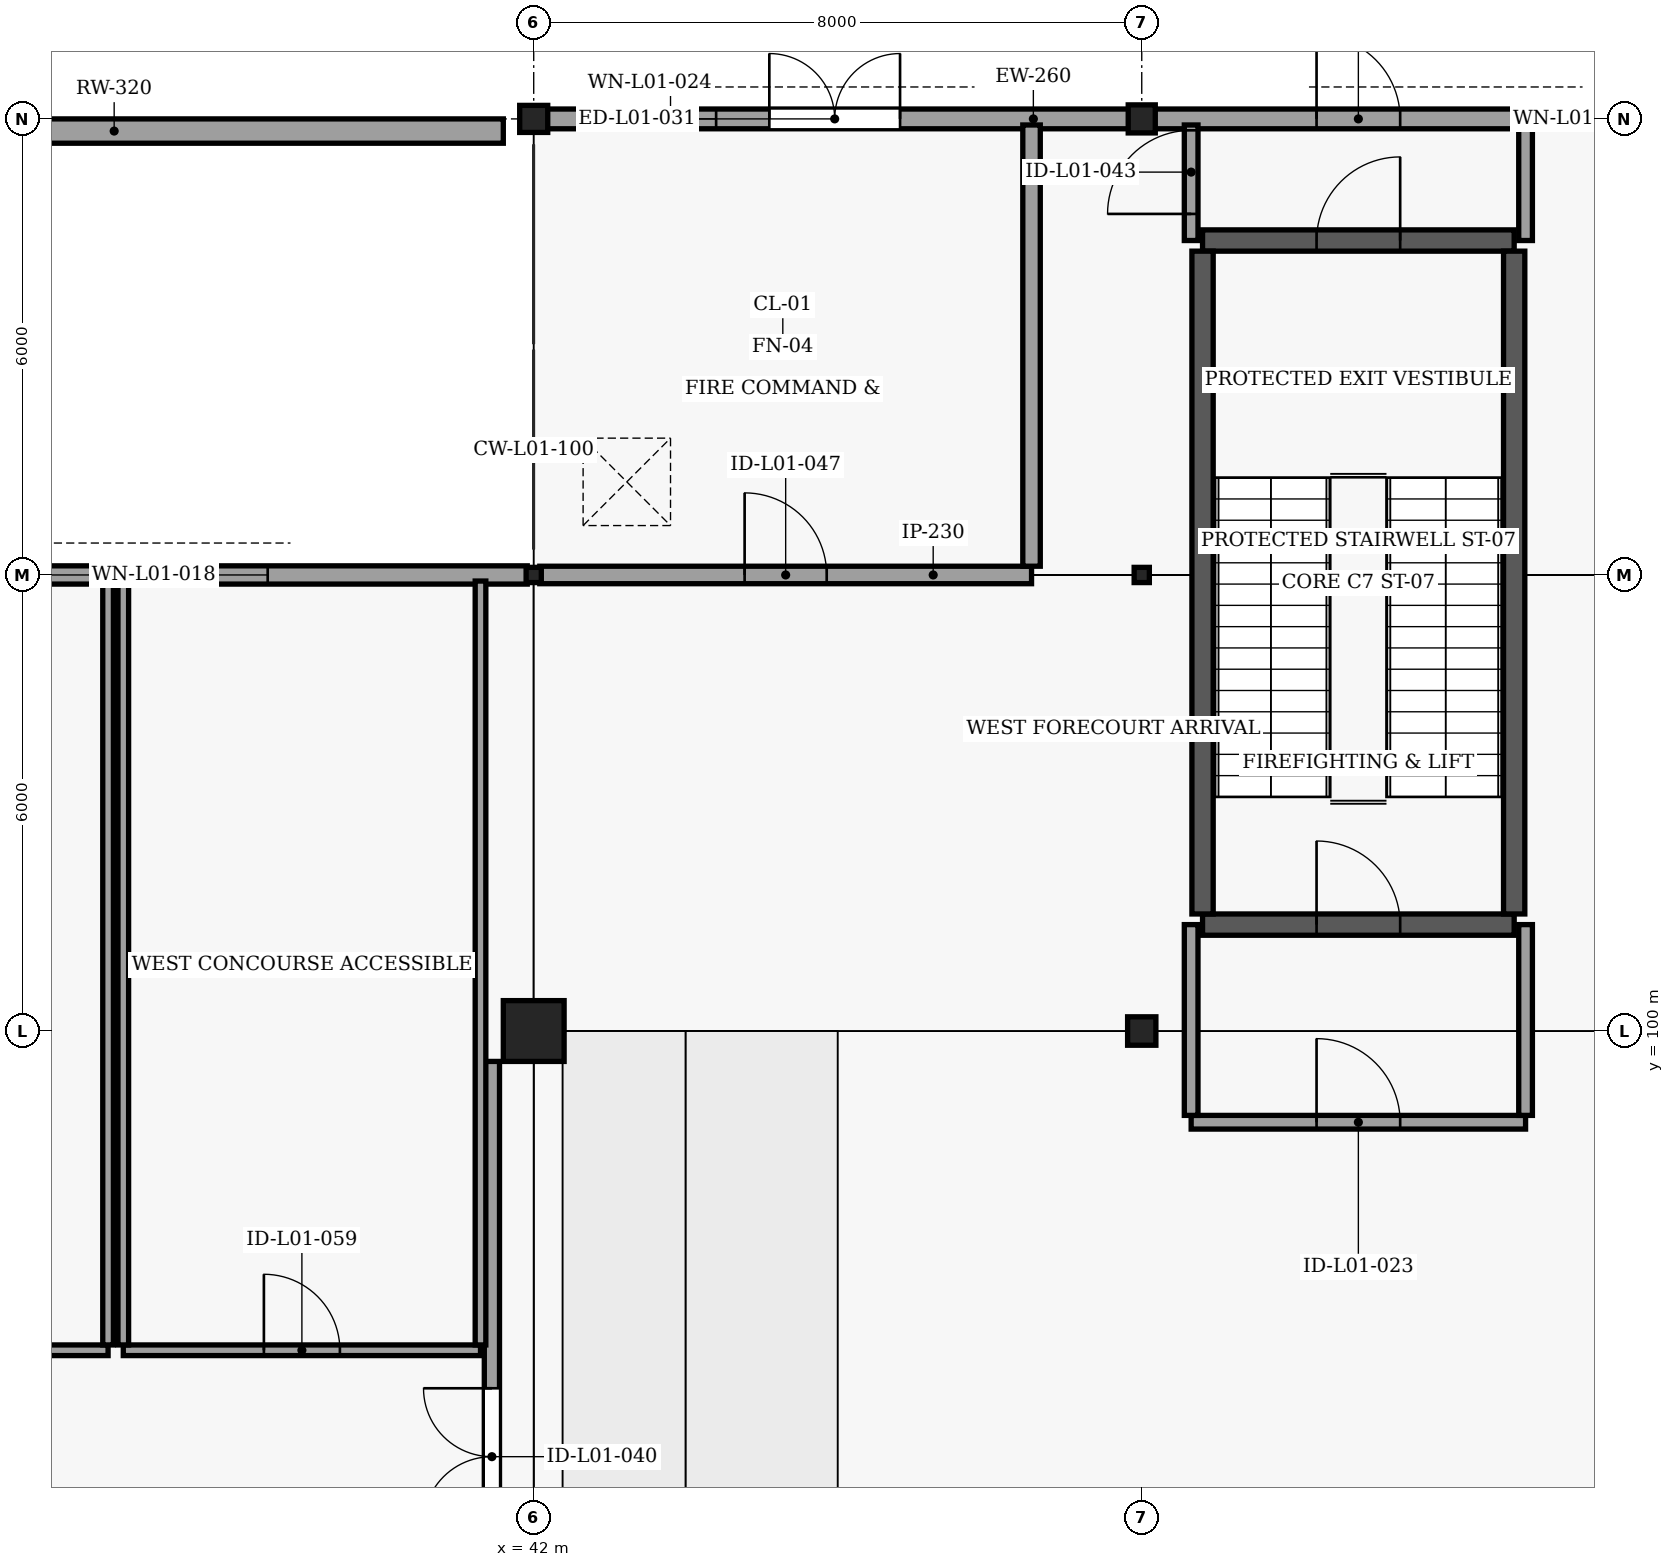
"""IFC4 building model, lengths in metres.
Left out: names, types, materials, properties, quantities, classifications, styles, units other than length and angle.
Written with IfcOpenShell. Run it as: python <this file> out.ifc"""

import sys

from ifc_helpers import new_model, si_unit, direction, frame, frame_2d, origin, origin_2d, place, context, subcontext, project, spatial, rectangle, hollow_rectangle, i_section, extrude, element, fill, save


model = new_model("IFC4")
c1 = context("Model", 3, precision=1e-05, world=origin(), true_north=direction((0.0, 1.0)))
c2 = subcontext(c1, "Body", "Model", "MODEL_VIEW")
j1 = project(units=[si_unit("LENGTHUNIT", "METRE"), si_unit("PLANEANGLEUNIT", "RADIAN")], contexts=[c1])
p1 = place(None, origin())
s1 = spatial("IfcSite", under=j1, at=p1, CompositionType="ELEMENT")
p2 = place(p1, origin())
s2 = spatial("IfcBuilding", under=s1, at=p2, CompositionType="ELEMENT")
p3 = place(p2, origin())
s3 = spatial("IfcBuildingStorey", under=s2, at=p3, CompositionType="ELEMENT", Elevation=0.0)
p4 = place(p3, frame((42.0, 100.0, -0.45), z_axis=(0.0, 0.0, 1.0), x_axis=(1.0, 0.0, 0.0)))
e1 = element("IfcColumn", 1, at=p4, inside=s3, PredefinedType="COLUMN", context=c2, shape_type="SweptSolid", body=[
    extrude(rectangle(XDim=0.8, YDim=0.8, at=origin_2d()), origin(), (0.0, 0.0, 1.0), 5.57),
])
p5 = place(p3, frame((50.0, 100.0, -0.45), z_axis=(0.0, 0.0, 1.0), x_axis=(0.0, 1.0, 0.0)))
e2 = element("IfcColumn", 2, at=p5, inside=s3, PredefinedType="COLUMN", context=c2, shape_type="SweptSolid", body=[
    extrude(i_section(OverallWidth=0.374, OverallDepth=0.372, WebThickness=0.016, FlangeThickness=0.026, FilletRadius=0.016, at=origin_2d()), origin(), (0.0, 0.0, 1.0), 5.57),
])
for number, where, z_axis, x_axis in (
    (3, (42.0, 106.0, -0.45), (0.0, 0.0, 1.0), (1.0, 0.0, 0.0)),
    (4, (50.0, 106.0, -0.45), (0.0, 0.0, 1.0), (1.0, 0.0, 0.0)),
):
    element("IfcColumn", number, at=place(p3, frame(where, z_axis=z_axis, x_axis=x_axis)), inside=s3, PredefinedType="COLUMN", context=c2, shape_type="SweptSolid", body=[
        extrude(hollow_rectangle(XDim=0.2, YDim=0.2, WallThickness=0.01, InnerFilletRadius=0.01, OuterFilletRadius=0.02, at=origin_2d()), origin(), (0.0, 0.0, 1.0), 5.57),
    ])
for number, where, z_axis, x_axis in (
    (5, (42.0, 112.0, -0.45), (0.0, 0.0, 1.0), (1.0, 0.0, 0.0)),
    (6, (50.0, 112.0, -0.45), (0.0, 0.0, 1.0), (0.0, 1.0, 0.0)),
):
    element("IfcColumn", number, at=place(p3, frame(where, z_axis=z_axis, x_axis=x_axis)), inside=s3, PredefinedType="COLUMN", context=c2, shape_type="SweptSolid", body=[
        extrude(i_section(OverallWidth=0.369, OverallDepth=0.356, WebThickness=0.011, FlangeThickness=0.018, FilletRadius=0.015, at=origin_2d()), origin(), (0.0, 0.0, 1.0), 5.57),
    ])
p6 = place(p3, frame((50.8, 101.4, -0.45), z_axis=(0.0, 0.0, 1.0), x_axis=(1.0, 0.0, 0.0)))
e7 = element("IfcWall", 7, at=p6, inside=s3, PredefinedType="SHEAR", context=c2, shape_type="SweptSolid", body=[
    extrude(rectangle(XDim=4.1, YDim=0.28, at=frame_2d((2.05, 0.0))), origin(), (0.0, 0.0, 1.0), 5.57),
])
p7 = place(p6, frame((1.5, 0.0, 0.45)))
e8 = element("IfcOpeningElement", 8, at=p7, cuts=e7, PredefinedType="OPENING", context=c2, shape_type="SweptSolid", body=[
    extrude(rectangle(XDim=1.1, YDim=2.2, at=frame_2d((0.55, 1.1))), frame((0.0, 0.15, 0.0), z_axis=(0.0, -1.0, 0.0), x_axis=(1.0, 0.0, 0.0)), (0.0, 0.0, 1.0), 0.3),
])
p8 = place(p3, frame((50.8, 110.4, -0.45), z_axis=(0.0, 0.0, 1.0), x_axis=(1.0, 0.0, 0.0)))
e9 = element("IfcWall", 9, at=p8, inside=s3, PredefinedType="SHEAR", context=c2, shape_type="SweptSolid", body=[
    extrude(rectangle(XDim=4.1, YDim=0.28, at=frame_2d((2.05, 0.0))), origin(), (0.0, 0.0, 1.0), 5.57),
])
p9 = place(p8, frame((1.5, 0.0, 0.45)))
e10 = element("IfcOpeningElement", 10, at=p9, cuts=e9, PredefinedType="OPENING", context=c2, shape_type="SweptSolid", body=[
    extrude(rectangle(XDim=1.1, YDim=2.2, at=frame_2d((0.55, 1.1))), frame((0.0, 0.15, 0.0), z_axis=(0.0, -1.0, 0.0), x_axis=(1.0, 0.0, 0.0)), (0.0, 0.0, 1.0), 0.3),
])
for number, where, z_axis, x_axis in (
    (11, (50.8, 101.54, -0.45), (0.0, 0.0, 1.0), (0.0, 1.0, 0.0)),
    (12, (54.9, 101.54, -0.45), (0.0, 0.0, 1.0), (0.0, 1.0, 0.0)),
):
    element("IfcWall", number, at=place(p3, frame(where, z_axis=z_axis, x_axis=x_axis)), inside=s3, PredefinedType="SHEAR", context=c2, shape_type="SweptSolid", body=[
        extrude(rectangle(XDim=8.72, YDim=0.28, at=frame_2d((4.36, 0.0))), origin(), (0.0, 0.0, 1.0), 5.57),
    ])
p10 = place(p3, frame((16.0, 111.84, -1.2), z_axis=(0.0, 0.0, 1.0), x_axis=(1.0, 0.0, 0.0)))
e13 = element("IfcWall", 13, at=p10, inside=s3, PredefinedType="POLYGONAL", context=c2, shape_type="SweptSolid", body=[
    extrude(rectangle(XDim=25.6, YDim=0.32, at=frame_2d((12.8, 0.0))), origin(), (0.0, 0.0, 1.0), 1.2),
])
p11 = place(p3, frame((32.085, 106.0, 0.0), z_axis=(0.0, 0.0, 1.0), x_axis=(1.0, 0.0, 0.0)))
e14 = element("IfcWall", 14, at=p11, inside=s3, PredefinedType="ELEMENTEDWALL", context=c2, shape_type="SweptSolid", body=[
    extrude(rectangle(XDim=9.83, YDim=0.24, at=frame_2d((4.915, 0.0))), origin(), (0.0, 0.0, 1.0), 4.658),
])
p12 = place(p11, frame((3.415, 0.0, 1.0)))
e15 = element("IfcOpeningElement", 15, at=p12, cuts=e14, PredefinedType="OPENING", context=c2, shape_type="SweptSolid", body=[
    extrude(rectangle(XDim=3.0, YDim=1.6, at=frame_2d((1.5, 0.8))), frame((0.0, 0.13, 0.0), z_axis=(0.0, -1.0, 0.0), x_axis=(1.0, 0.0, 0.0)), (0.0, 0.0, 1.0), 0.26),
])
p13 = place(p3, frame((42.169, 112.0, 0.0), z_axis=(0.0, 0.0, 1.0), x_axis=(1.0, 0.0, 0.0)))
e16 = element("IfcWall", 16, at=p13, inside=s3, PredefinedType="SOLIDWALL", context=c2, shape_type="SweptSolid", body=[
    extrude(rectangle(XDim=8.006, YDim=0.26, at=frame_2d((4.003, 0.0))), origin(), (0.0, 0.0, 1.0), 4.658),
])
p14 = place(p13, frame((2.93, 0.0, 0.0)))
e17 = element("IfcOpeningElement", 17, at=p14, cuts=e16, PredefinedType="OPENING", context=c2, shape_type="SweptSolid", body=[
    extrude(rectangle(XDim=1.72, YDim=2.22, at=frame_2d((0.86, 1.11))), frame((0.0, 0.14, 0.0), z_axis=(0.0, -1.0, 0.0), x_axis=(1.0, 0.0, 0.0)), (0.0, 0.0, 1.0), 0.28),
])
p15 = place(p13, frame((1.031, 0.0, 1.2)))
e18 = element("IfcOpeningElement", 18, at=p15, cuts=e16, PredefinedType="OPENING", context=c2, shape_type="SweptSolid", body=[
    extrude(rectangle(XDim=1.2, YDim=1.4, at=frame_2d((0.6, 0.7))), frame((0.0, 0.14, 0.0), z_axis=(0.0, -1.0, 0.0), x_axis=(1.0, 0.0, 0.0)), (0.0, 0.0, 1.0), 0.28),
])
p16 = place(p3, frame((50.163, 112.0, 0.0), z_axis=(0.0, 0.0, 1.0), x_axis=(1.0, 0.0, 0.0)))
e19 = element("IfcWall", 19, at=p16, inside=s3, PredefinedType="SOLIDWALL", context=c2, shape_type="SweptSolid", body=[
    extrude(rectangle(XDim=8.018, YDim=0.26, at=frame_2d((4.009, 0.0))), origin(), (0.0, 0.0, 1.0), 4.658),
])
p17 = place(p16, frame((2.137, 0.0, 0.0)))
e20 = element("IfcOpeningElement", 20, at=p17, cuts=e19, PredefinedType="OPENING", context=c2, shape_type="SweptSolid", body=[
    extrude(rectangle(XDim=1.1, YDim=2.2, at=frame_2d((0.55, 1.1))), frame((0.0, 0.14, 0.0), z_axis=(0.0, -1.0, 0.0), x_axis=(1.0, 0.0, 0.0)), (0.0, 0.0, 1.0), 0.28),
])
p18 = place(p16, frame((4.937, 0.0, 1.2)))
e21 = element("IfcOpeningElement", 21, at=p18, cuts=e19, PredefinedType="OPENING", context=c2, shape_type="SweptSolid", body=[
    extrude(rectangle(XDim=1.2, YDim=1.4, at=frame_2d((0.6, 0.7))), frame((0.0, 0.14, 0.0), z_axis=(0.0, -1.0, 0.0), x_axis=(1.0, 0.0, 0.0)), (0.0, 0.0, 1.0), 0.28),
])
p19 = place(p3, frame((50.65, 98.8, 0.0), z_axis=(0.0, 0.0, 1.0), x_axis=(1.0, 0.0, 0.0)))
e22 = element("IfcWall", 22, at=p19, inside=s3, PredefinedType="SOLIDWALL", context=c2, shape_type="SweptSolid", body=[
    extrude(rectangle(XDim=4.4, YDim=0.18, at=frame_2d((2.2, 0.0))), origin(), (0.0, 0.0, 1.0), 5.1),
])
p20 = place(p19, frame((1.65, 0.0, 0.0)))
e23 = element("IfcOpeningElement", 23, at=p20, cuts=e22, PredefinedType="OPENING", context=c2, shape_type="SweptSolid", body=[
    extrude(rectangle(XDim=1.1, YDim=2.2, at=frame_2d((0.55, 1.1))), frame((0.0, 0.1, 0.0), z_axis=(0.0, -1.0, 0.0), x_axis=(1.0, 0.0, 0.0)), (0.0, 0.0, 1.0), 0.2),
])
for number, where, z_axis, x_axis in (
    (24, (50.65, 98.89, 0.0), (0.0, 0.0, 1.0), (0.0, 1.0, 0.0)),
    (25, (55.05, 98.89, 0.0), (0.0, 0.0, 1.0), (0.0, 1.0, 0.0)),
):
    element("IfcWall", number, at=place(p3, frame(where, z_axis=z_axis, x_axis=x_axis)), inside=s3, PredefinedType="SOLIDWALL", context=c2, shape_type="SweptSolid", body=[
        extrude(rectangle(XDim=2.51, YDim=0.18, at=frame_2d((1.255, 0.0))), origin(), (0.0, 0.0, 1.0), 4.651),
    ])
p21 = place(p3, frame((41.45, 89.4, 0.0), z_axis=(0.0, 0.0, 1.0), x_axis=(0.0, 1.0, 0.0)))
e26 = element("IfcWall", 26, at=p21, inside=s3, PredefinedType="SOLIDWALL", context=c2, shape_type="SweptSolid", body=[
    extrude(rectangle(XDim=10.2, YDim=0.2, at=frame_2d((5.1, 0.0))), origin(), (0.0, 0.0, 1.0), 4.807),
])
p22 = place(p21, frame((4.1, 0.0, 0.0)))
e27 = element("IfcOpeningElement", 27, at=p22, cuts=e26, PredefinedType="OPENING", context=c2, shape_type="SweptSolid", body=[
    extrude(rectangle(XDim=1.8, YDim=2.2, at=frame_2d((0.9, 1.1))), frame((0.0, 0.11, 0.0), z_axis=(0.0, -1.0, 0.0), x_axis=(1.0, 0.0, 0.0)), (0.0, 0.0, 1.0), 0.22),
])
p23 = place(p3, frame((50.65, 110.4, 0.0), z_axis=(0.0, 0.0, 1.0), x_axis=(0.0, 1.0, 0.0)))
e28 = element("IfcWall", 28, at=p23, inside=s3, PredefinedType="SOLIDWALL", context=c2, shape_type="SweptSolid", body=[
    extrude(rectangle(XDim=1.52, YDim=0.18, at=frame_2d((0.76, 0.0))), origin(), (0.0, 0.0, 1.0), 5.1),
])
p24 = place(p23, frame((0.35, 0.0, 0.0)))
e29 = element("IfcOpeningElement", 29, at=p24, cuts=e28, PredefinedType="OPENING", context=c2, shape_type="SweptSolid", body=[
    extrude(rectangle(XDim=1.1, YDim=2.2, at=frame_2d((0.55, 1.1))), frame((0.0, 0.1, 0.0), z_axis=(0.0, -1.0, 0.0), x_axis=(1.0, 0.0, 0.0)), (0.0, 0.0, 1.0), 0.2),
])
p25 = place(p3, frame((55.05, 110.4, 0.0), z_axis=(0.0, 0.0, 1.0), x_axis=(0.0, 1.0, 0.0)))
e30 = element("IfcWall", 30, at=p25, inside=s3, PredefinedType="SOLIDWALL", context=c2, shape_type="SweptSolid", body=[
    extrude(rectangle(XDim=1.52, YDim=0.18, at=frame_2d((0.76, 0.0))), origin(), (0.0, 0.0, 1.0), 5.1),
])
p26 = place(p3, frame((42.08, 106.0, 0.0), z_axis=(0.0, 0.0, 1.0), x_axis=(1.0, 0.0, 0.0)))
e31 = element("IfcWall", 31, at=p26, inside=s3, PredefinedType="SOLIDWALL", context=c2, shape_type="SweptSolid", body=[
    extrude(rectangle(XDim=6.47, YDim=0.23, at=frame_2d((3.235, 0.0))), origin(), (0.0, 0.0, 1.0), 4.66),
])
p27 = place(p26, frame((2.695, 0.0, 0.0)))
e32 = element("IfcOpeningElement", 32, at=p27, cuts=e31, PredefinedType="OPENING", context=c2, shape_type="SweptSolid", body=[
    extrude(rectangle(XDim=1.08, YDim=2.2, at=frame_2d((0.54, 1.1))), frame((0.0, 0.125, 0.0), z_axis=(0.0, -1.0, 0.0), x_axis=(1.0, 0.0, 0.0)), (0.0, 0.0, 1.0), 0.25),
])
p28 = place(p3, frame((48.55, 106.115, 0.0), z_axis=(0.0, 0.0, 1.0), x_axis=(0.0, 1.0, 0.0)))
e33 = element("IfcWall", 33, at=p28, inside=s3, PredefinedType="SOLIDWALL", context=c2, shape_type="SweptSolid", body=[
    extrude(rectangle(XDim=5.805, YDim=0.23, at=frame_2d((2.902, 0.0))), origin(), (0.0, 0.0, 1.0), 4.807),
])
p29 = place(p3, frame((30.8, 95.8, 0.0), z_axis=(0.0, 0.0, 1.0), x_axis=(1.0, 0.0, 0.0)))
e34 = element("IfcWall", 34, at=p29, inside=s3, PredefinedType="PARTITIONING", context=c2, shape_type="SweptSolid", body=[
    extrude(rectangle(XDim=5.6, YDim=0.14, at=frame_2d((2.8, 0.0))), origin(), (0.0, 0.0, 1.0), 4.703),
])
p30 = place(p29, frame((2.35, 0.0, 0.0)))
e35 = element("IfcOpeningElement", 35, at=p30, cuts=e34, PredefinedType="OPENING", context=c2, shape_type="SweptSolid", body=[
    extrude(rectangle(XDim=0.9, YDim=2.1, at=frame_2d((0.45, 1.05))), frame((0.0, 0.08, 0.0), z_axis=(0.0, -1.0, 0.0), x_axis=(1.0, 0.0, 0.0)), (0.0, 0.0, 1.0), 0.16),
])
p31 = place(p3, frame((36.4, 95.87, 0.0), z_axis=(0.0, 0.0, 1.0), x_axis=(0.0, 1.0, 0.0)))
e36 = element("IfcWall", 36, at=p31, inside=s3, PredefinedType="PARTITIONING", context=c2, shape_type="SweptSolid", body=[
    extrude(rectangle(XDim=10.05, YDim=0.14, at=frame_2d((5.025, 0.0))), origin(), (0.0, 0.0, 1.0), 4.66),
])
p32 = place(p3, frame((36.6, 95.8, 0.0), z_axis=(0.0, 0.0, 1.0), x_axis=(1.0, 0.0, 0.0)))
e37 = element("IfcWall", 37, at=p32, inside=s3, PredefinedType="PARTITIONING", context=c2, shape_type="SweptSolid", body=[
    extrude(rectangle(XDim=4.7, YDim=0.14, at=frame_2d((2.35, 0.0))), origin(), (0.0, 0.0, 1.0), 5.1),
])
p33 = place(p32, frame((1.85, 0.0, 0.0)))
e38 = element("IfcOpeningElement", 38, at=p33, cuts=e37, PredefinedType="OPENING", context=c2, shape_type="SweptSolid", body=[
    extrude(rectangle(XDim=1.0, YDim=2.15, at=frame_2d((0.5, 1.075))), frame((0.0, 0.08, 0.0), z_axis=(0.0, -1.0, 0.0), x_axis=(1.0, 0.0, 0.0)), (0.0, 0.0, 1.0), 0.16),
])
for number, where, z_axis, x_axis in (
    (39, (36.6, 95.87, 0.0), (0.0, 0.0, 1.0), (0.0, 1.0, 0.0)),
    (40, (41.3, 95.87, 0.0), (0.0, 0.0, 1.0), (0.0, 1.0, 0.0)),
):
    element("IfcWall", number, at=place(p3, frame(where, z_axis=z_axis, x_axis=x_axis)), inside=s3, PredefinedType="PARTITIONING", context=c2, shape_type="SweptSolid", body=[
        extrude(rectangle(XDim=10.05, YDim=0.14, at=frame_2d((5.025, 0.0))), origin(), (0.0, 0.0, 1.0), 4.66),
    ])
p34 = place(p7, origin())
e41 = element("IfcDoor", 41, at=p34, inside=s3, OperationType="SINGLE_SWING_LEFT", PredefinedType="DOOR", context=c2, shape_type="SweptSolid", body=[
    extrude(rectangle(XDim=1.1, YDim=2.2, at=frame_2d((0.55, 1.1))), frame((0.0, 0.025, 0.0), z_axis=(0.0, -1.0, 0.0), x_axis=(1.0, 0.0, 0.0)), (0.0, 0.0, 1.0), 0.05),
])
fill(e8, e41)
p35 = place(p9, origin())
e42 = element("IfcDoor", 42, at=p35, inside=s3, OperationType="SINGLE_SWING_RIGHT", PredefinedType="DOOR", context=c2, shape_type="SweptSolid", body=[
    extrude(rectangle(XDim=1.1, YDim=2.2, at=frame_2d((0.55, 1.1))), frame((0.0, 0.025, 0.0), z_axis=(0.0, -1.0, 0.0), x_axis=(1.0, 0.0, 0.0)), (0.0, 0.0, 1.0), 0.05),
])
fill(e10, e42)
p36 = place(p12, origin())
e43 = element("IfcWindow", 43, at=p36, inside=s3, PartitioningType="SINGLE_PANEL", PredefinedType="WINDOW", context=c2, shape_type="SweptSolid", body=[
    extrude(rectangle(XDim=3.0, YDim=1.6, at=frame_2d((1.5, 0.8))), frame((0.0, 0.03, 0.0), z_axis=(0.0, -1.0, 0.0), x_axis=(1.0, 0.0, 0.0)), (0.0, 0.0, 1.0), 0.06),
])
fill(e15, e43)
p37 = place(p14, origin())
e44 = element("IfcDoor", 44, at=p37, inside=s3, OperationType="DOUBLE_DOOR_SINGLE_SWING", PredefinedType="DOOR", context=c2, shape_type="SweptSolid", body=[
    extrude(rectangle(XDim=1.72, YDim=2.22, at=frame_2d((0.86, 1.11))), frame((0.0, 0.025, 0.0), z_axis=(0.0, -1.0, 0.0), x_axis=(1.0, 0.0, 0.0)), (0.0, 0.0, 1.0), 0.05),
])
fill(e17, e44)
p38 = place(p15, origin())
e45 = element("IfcWindow", 45, at=p38, inside=s3, PartitioningType="SINGLE_PANEL", PredefinedType="WINDOW", context=c2, shape_type="SweptSolid", body=[
    extrude(rectangle(XDim=1.2, YDim=1.4, at=frame_2d((0.6, 0.7))), frame((0.0, 0.03, 0.0), z_axis=(0.0, -1.0, 0.0), x_axis=(1.0, 0.0, 0.0)), (0.0, 0.0, 1.0), 0.06),
])
fill(e18, e45)
p39 = place(p17, origin())
e46 = element("IfcDoor", 46, at=p39, inside=s3, OperationType="SINGLE_SWING_LEFT", PredefinedType="DOOR", context=c2, shape_type="SweptSolid", body=[
    extrude(rectangle(XDim=1.1, YDim=2.2, at=frame_2d((0.55, 1.1))), frame((0.0, 0.025, 0.0), z_axis=(0.0, -1.0, 0.0), x_axis=(1.0, 0.0, 0.0)), (0.0, 0.0, 1.0), 0.05),
])
fill(e20, e46)
p40 = place(p18, origin())
e47 = element("IfcWindow", 47, at=p40, inside=s3, PartitioningType="SINGLE_PANEL", PredefinedType="WINDOW", context=c2, shape_type="SweptSolid", body=[
    extrude(rectangle(XDim=1.2, YDim=1.4, at=frame_2d((0.6, 0.7))), frame((0.0, 0.03, 0.0), z_axis=(0.0, -1.0, 0.0), x_axis=(1.0, 0.0, 0.0)), (0.0, 0.0, 1.0), 0.06),
])
fill(e21, e47)
p41 = place(p20, origin())
e48 = element("IfcDoor", 48, at=p41, inside=s3, OperationType="SINGLE_SWING_LEFT", PredefinedType="DOOR", context=c2, shape_type="SweptSolid", body=[
    extrude(rectangle(XDim=1.1, YDim=2.2, at=frame_2d((0.55, 1.1))), frame((0.0, 0.025, 0.0), z_axis=(0.0, -1.0, 0.0), x_axis=(1.0, 0.0, 0.0)), (0.0, 0.0, 1.0), 0.05),
])
fill(e23, e48)
p42 = place(p22, origin())
e49 = element("IfcDoor", 49, at=p42, inside=s3, OperationType="DOUBLE_DOOR_SINGLE_SWING", PredefinedType="DOOR", context=c2, shape_type="SweptSolid", body=[
    extrude(rectangle(XDim=1.8, YDim=2.2, at=frame_2d((0.9, 1.1))), frame((0.0, 0.025, 0.0), z_axis=(0.0, -1.0, 0.0), x_axis=(1.0, 0.0, 0.0)), (0.0, 0.0, 1.0), 0.05),
])
fill(e27, e49)
p43 = place(p24, origin())
e50 = element("IfcDoor", 50, at=p43, inside=s3, OperationType="SINGLE_SWING_LEFT", PredefinedType="DOOR", context=c2, shape_type="SweptSolid", body=[
    extrude(rectangle(XDim=1.1, YDim=2.2, at=frame_2d((0.55, 1.1))), frame((0.0, 0.025, 0.0), z_axis=(0.0, -1.0, 0.0), x_axis=(1.0, 0.0, 0.0)), (0.0, 0.0, 1.0), 0.05),
])
fill(e29, e50)
p44 = place(p27, origin())
e51 = element("IfcDoor", 51, at=p44, inside=s3, OperationType="SINGLE_SWING_LEFT", PredefinedType="DOOR", context=c2, shape_type="SweptSolid", body=[
    extrude(rectangle(XDim=1.08, YDim=2.2, at=frame_2d((0.54, 1.1))), frame((0.0, 0.025, 0.0), z_axis=(0.0, -1.0, 0.0), x_axis=(1.0, 0.0, 0.0)), (0.0, 0.0, 1.0), 0.05),
])
fill(e32, e51)
p45 = place(p33, origin())
e52 = element("IfcDoor", 52, at=p45, inside=s3, OperationType="SINGLE_SWING_LEFT", PredefinedType="DOOR", context=c2, shape_type="SweptSolid", body=[
    extrude(rectangle(XDim=1.0, YDim=2.15, at=frame_2d((0.5, 1.075))), frame((0.0, 0.025, 0.0), z_axis=(0.0, -1.0, 0.0), x_axis=(1.0, 0.0, 0.0)), (0.0, 0.0, 1.0), 0.05),
])
fill(e38, e52)
save(model, sys.argv[1])
